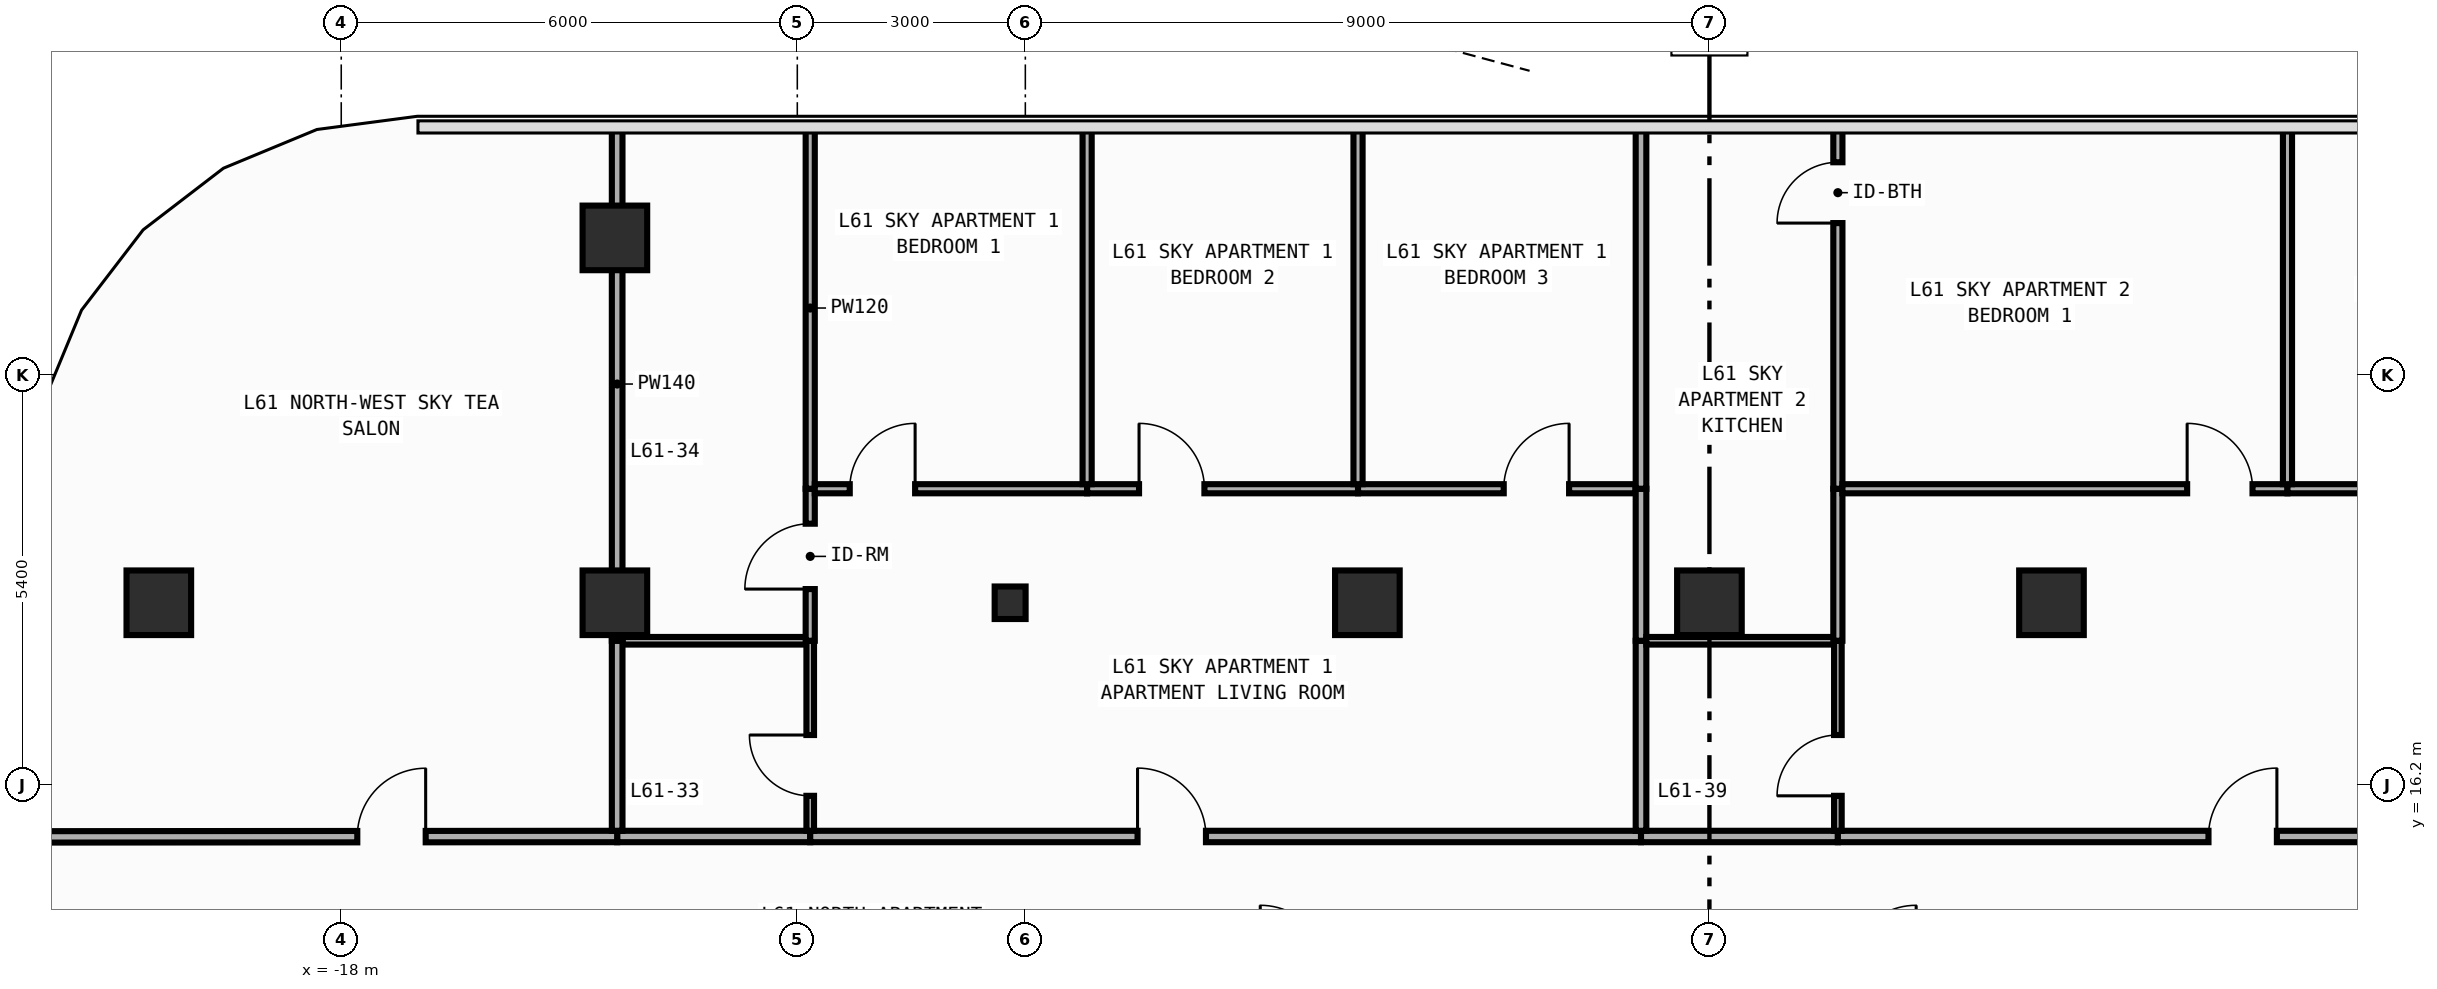
"""IFC4 building model, lengths in metres.
Left out: names, types, materials, properties, quantities, classifications, styles, units other than length and angle.
Written with IfcOpenShell. Run it as: python <this file> out.ifc"""

import sys

from ifc_helpers import new_model, si_unit, direction, frame, frame_2d, origin, origin_2d, place, context, subcontext, project, spatial, rectangle, i_section, extrude, element, fill, save


model = new_model("IFC4")
c1 = context("Model", 3, precision=1e-05, world=origin(), true_north=direction((0.0, 1.0)))
c2 = subcontext(c1, "Body", "Model", "MODEL_VIEW")
j1 = project(units=[si_unit("LENGTHUNIT", "METRE"), si_unit("PLANEANGLEUNIT", "RADIAN")], contexts=[c1])
p1 = place(None, origin())
s1 = spatial("IfcSite", under=j1, at=p1, CompositionType="ELEMENT")
p2 = place(p1, origin())
s2 = spatial("IfcBuilding", under=s1, at=p2, CompositionType="ELEMENT")
p3 = place(p2, frame((0.0, 0.0, 258.4)))
s3 = spatial("IfcBuildingStorey", under=s2, at=p3, CompositionType="ELEMENT", Elevation=258.4)
p4 = place(p3, frame((-9.2, 18.6, 0.0), z_axis=(0.0, 0.0, 1.0), x_axis=(1.0, 0.0, 0.0)))
e1 = element("IfcColumn", 1, at=p4, inside=s3, PredefinedType="COLUMN", context=c2, shape_type="SweptSolid", body=[
    extrude(i_section(OverallWidth=0.407, OverallDepth=0.428, WebThickness=0.02, FlangeThickness=0.035, FilletRadius=0.022, at=origin_2d()), origin(), (0.0, 0.0, 1.0), 3.6),
])
for number, where, z_axis, x_axis in (
    (2, (-20.4, 18.6, 0.0), (0.0, 0.0, 1.0), (1.0, 0.0, 0.0)),
    (3, (-14.4, 18.6, 0.0), (0.0, 0.0, 1.0), (1.0, 0.0, 0.0)),
    (4, (-4.5, 18.6, 0.0), (0.0, 0.0, 1.0), (1.0, 0.0, 0.0)),
    (5, (0.0, 18.6, 0.0), (0.0, 0.0, 1.0), (1.0, 0.0, 0.0)),
    (6, (4.5, 18.6, 0.0), (0.0, 0.0, 1.0), (1.0, 0.0, 0.0)),
    (7, (-14.4, 23.4, 0.0), (0.0, 0.0, 1.0), (1.0, 0.0, 0.0)),
):
    element("IfcColumn", number, at=place(p3, frame(where, z_axis=z_axis, x_axis=x_axis)), inside=s3, PredefinedType="COLUMN", context=c2, shape_type="SweptSolid", body=[
        extrude(rectangle(XDim=0.85, YDim=0.85, at=origin_2d()), origin(), (0.0, 0.0, 1.0), 3.6),
    ])
p5 = place(p3, frame((-14.37, 15.525, 0.0), z_axis=(0.0, 0.0, 1.0), x_axis=(1.0, 0.0, 0.0)))
e8 = element("IfcWall", 8, at=p5, inside=s3, PredefinedType="PARTITIONING", context=c2, shape_type="SweptSolid", body=[
    extrude(rectangle(XDim=2.54, YDim=0.15, at=frame_2d((1.27, 0.0))), origin(), (0.0, 0.0, 1.0), 3.34),
])
p6 = place(p3, frame((-11.83, 15.525, 0.0), z_axis=(0.0, 0.0, 1.0), x_axis=(1.0, 0.0, 0.0)))
e9 = element("IfcWall", 9, at=p6, inside=s3, PredefinedType="PARTITIONING", context=c2, shape_type="SweptSolid", body=[
    extrude(rectangle(XDim=10.93, YDim=0.15, at=frame_2d((5.465, 0.0))), origin(), (0.0, 0.0, 1.0), 3.34),
])
p7 = place(p6, frame((4.306, 0.0, 0.0)))
e10 = element("IfcOpeningElement", 10, at=p7, cuts=e9, PredefinedType="OPENING", context=c2, shape_type="SweptSolid", body=[
    extrude(rectangle(XDim=0.9, YDim=2.15, at=frame_2d((0.45, 1.075))), frame((0.0, 0.085, 0.0), z_axis=(0.0, -1.0, 0.0), x_axis=(1.0, 0.0, 0.0)), (0.0, 0.0, 1.0), 0.17),
])
p8 = place(p3, frame((-0.9, 15.525, 0.0), z_axis=(0.0, 0.0, 1.0), x_axis=(1.0, 0.0, 0.0)))
e11 = element("IfcWall", 11, at=p8, inside=s3, PredefinedType="PARTITIONING", context=c2, shape_type="SweptSolid", body=[
    extrude(rectangle(XDim=2.59, YDim=0.15, at=frame_2d((1.295, 0.0))), origin(), (0.0, 0.0, 1.0), 3.34),
])
p9 = place(p3, frame((1.69, 15.525, 0.0), z_axis=(0.0, 0.0, 1.0), x_axis=(1.0, 0.0, 0.0)))
e12 = element("IfcWall", 12, at=p9, inside=s3, PredefinedType="PARTITIONING", context=c2, shape_type="SweptSolid", body=[
    extrude(rectangle(XDim=10.25, YDim=0.15, at=frame_2d((5.125, 0.0))), origin(), (0.0, 0.0, 1.0), 3.34),
])
p10 = place(p9, frame((4.876, 0.0, 0.0)))
e13 = element("IfcOpeningElement", 13, at=p10, cuts=e12, PredefinedType="OPENING", context=c2, shape_type="SweptSolid", body=[
    extrude(rectangle(XDim=0.9, YDim=2.15, at=frame_2d((0.45, 1.075))), frame((0.0, 0.085, 0.0), z_axis=(0.0, -1.0, 0.0), x_axis=(1.0, 0.0, 0.0)), (0.0, 0.0, 1.0), 0.17),
])
p11 = place(p3, frame((-21.955, 15.52, 0.0), z_axis=(0.0, 0.0, 1.0), x_axis=(0.999999792794, 0.000643749062, 0.0)))
e14 = element("IfcWall", 14, at=p11, inside=s3, PredefinedType="PARTITIONING", context=c2, shape_type="SweptSolid", body=[
    extrude(rectangle(XDim=7.585, YDim=0.15, at=frame_2d((3.792, 0.0))), origin(), (0.0, 0.0, 1.0), 3.34),
])
p12 = place(p11, frame((4.166, 0.0, 0.0)))
e15 = element("IfcOpeningElement", 15, at=p12, cuts=e14, PredefinedType="OPENING", context=c2, shape_type="SweptSolid", body=[
    extrude(rectangle(XDim=0.9, YDim=2.15, at=frame_2d((0.45, 1.075))), frame((0.0, 0.085, 0.0), z_axis=(0.0, -1.0, 0.0), x_axis=(1.0, 0.0, 0.0)), (0.0, 0.0, 1.0), 0.17),
])
p13 = place(p3, frame((-14.3, 18.1, 0.0), z_axis=(0.0, 0.0, 1.0), x_axis=(1.0, 0.0, 0.0)))
e16 = element("IfcWall", 16, at=p13, inside=s3, PredefinedType="PARTITIONING", context=c2, shape_type="SweptSolid", body=[
    extrude(rectangle(XDim=2.42, YDim=0.1, at=frame_2d((1.21, 0.0))), origin(), (0.0, 0.0, 1.0), 3.34),
])
p14 = place(p3, frame((-11.83, 15.6, 0.0), z_axis=(0.0, 0.0, 1.0), x_axis=(0.0, 1.0, 0.0)))
e17 = element("IfcWall", 17, at=p14, inside=s3, PredefinedType="PARTITIONING", context=c2, shape_type="SweptSolid", body=[
    extrude(rectangle(XDim=2.5, YDim=0.1, at=frame_2d((1.25, 0.0))), origin(), (0.0, 0.0, 1.0), 3.34),
])
p15 = place(p14, frame((0.46, 0.0, 0.0)))
e18 = element("IfcOpeningElement", 18, at=p15, cuts=e17, PredefinedType="OPENING", context=c2, shape_type="SweptSolid", body=[
    extrude(rectangle(XDim=0.8, YDim=2.1, at=frame_2d((0.4, 1.05))), frame((0.0, 0.06, 0.0), z_axis=(0.0, -1.0, 0.0), x_axis=(1.0, 0.0, 0.0)), (0.0, 0.0, 1.0), 0.12),
])
p16 = place(p3, frame((-14.37, 15.6, 0.0), z_axis=(0.0, 0.0, 1.0), x_axis=(0.0, 1.0, 0.0)))
e19 = element("IfcWall", 19, at=p16, inside=s3, PredefinedType="PARTITIONING", context=c2, shape_type="SweptSolid", body=[
    extrude(rectangle(XDim=2.5, YDim=0.14, at=frame_2d((1.25, 0.0))), origin(), (0.0, 0.0, 1.0), 3.34),
])
p17 = place(p3, frame((-11.83, 18.1, 0.0), z_axis=(0.0, 0.0, 1.0), x_axis=(0.0, 1.0, 0.0)))
e20 = element("IfcWall", 20, at=p17, inside=s3, PredefinedType="PARTITIONING", context=c2, shape_type="SweptSolid", body=[
    extrude(rectangle(XDim=2.0, YDim=0.12, at=frame_2d((1.0, 0.0))), origin(), (0.0, 0.0, 1.0), 3.34),
])
p18 = place(p17, frame((0.68, 0.0, 0.0)))
e21 = element("IfcOpeningElement", 21, at=p18, cuts=e20, PredefinedType="OPENING", context=c2, shape_type="SweptSolid", body=[
    extrude(rectangle(XDim=0.86, YDim=2.15, at=frame_2d((0.43, 1.075))), frame((0.0, 0.07, 0.0), z_axis=(0.0, -1.0, 0.0), x_axis=(1.0, 0.0, 0.0)), (0.0, 0.0, 1.0), 0.14),
])
p19 = place(p3, frame((-11.83, 20.1, 0.0), z_axis=(0.0, 0.0, 1.0), x_axis=(0.0, 1.0, 0.0)))
e22 = element("IfcWall", 22, at=p19, inside=s3, PredefinedType="PARTITIONING", context=c2, shape_type="SweptSolid", body=[
    extrude(rectangle(XDim=4.755, YDim=0.12, at=frame_2d((2.377, 0.0))), origin(), (0.0, 0.0, 1.0), 3.34),
])
p20 = place(p3, frame((-14.37, 18.1, 0.0), z_axis=(0.0, 0.0, 1.0), x_axis=(0.0, 1.0, 0.0)))
e23 = element("IfcWall", 23, at=p20, inside=s3, PredefinedType="PARTITIONING", context=c2, shape_type="SweptSolid", body=[
    extrude(rectangle(XDim=6.755, YDim=0.14, at=frame_2d((3.377, 0.0))), origin(), (0.0, 0.0, 1.0), 1.94),
])
p21 = place(p3, frame((-11.77, 20.1, 0.0), z_axis=(0.0, 0.0, 1.0), x_axis=(1.0, 0.0, 0.0)))
e24 = element("IfcWall", 24, at=p21, inside=s3, PredefinedType="PARTITIONING", context=c2, shape_type="SweptSolid", body=[
    extrude(rectangle(XDim=3.583, YDim=0.12, at=frame_2d((1.792, 0.0))), origin(), (0.0, 0.0, 1.0), 3.34),
])
p22 = place(p21, frame((0.46, 0.0, 0.0)))
e25 = element("IfcOpeningElement", 25, at=p22, cuts=e24, PredefinedType="OPENING", context=c2, shape_type="SweptSolid", body=[
    extrude(rectangle(XDim=0.86, YDim=2.15, at=frame_2d((0.43, 1.075))), frame((0.0, 0.07, 0.0), z_axis=(0.0, -1.0, 0.0), x_axis=(1.0, 0.0, 0.0)), (0.0, 0.0, 1.0), 0.14),
])
p23 = place(p3, frame((-8.187, 20.1, 0.0), z_axis=(0.0, 0.0, 1.0), x_axis=(1.0, 0.0, 0.0)))
e26 = element("IfcWall", 26, at=p23, inside=s3, PredefinedType="PARTITIONING", context=c2, shape_type="SweptSolid", body=[
    extrude(rectangle(XDim=3.564, YDim=0.12, at=frame_2d((1.782, 0.0))), origin(), (0.0, 0.0, 1.0), 3.34),
])
p24 = place(p23, frame((0.683, 0.0, 0.0)))
e27 = element("IfcOpeningElement", 27, at=p24, cuts=e26, PredefinedType="OPENING", context=c2, shape_type="SweptSolid", body=[
    extrude(rectangle(XDim=0.86, YDim=2.15, at=frame_2d((0.43, 1.075))), frame((0.0, 0.07, 0.0), z_axis=(0.0, -1.0, 0.0), x_axis=(1.0, 0.0, 0.0)), (0.0, 0.0, 1.0), 0.14),
])
p25 = place(p3, frame((-4.623, 20.1, 0.0), z_axis=(0.0, 0.0, 1.0), x_axis=(1.0, 0.0, 0.0)))
e28 = element("IfcWall", 28, at=p25, inside=s3, PredefinedType="PARTITIONING", context=c2, shape_type="SweptSolid", body=[
    extrude(rectangle(XDim=3.653, YDim=0.12, at=frame_2d((1.827, 0.0))), origin(), (0.0, 0.0, 1.0), 3.34),
])
p26 = place(p25, frame((1.917, 0.0, 0.0)))
e29 = element("IfcOpeningElement", 29, at=p26, cuts=e28, PredefinedType="OPENING", context=c2, shape_type="SweptSolid", body=[
    extrude(rectangle(XDim=0.86, YDim=2.15, at=frame_2d((0.43, 1.075))), frame((0.0, 0.07, 0.0), z_axis=(0.0, -1.0, 0.0), x_axis=(1.0, 0.0, 0.0)), (0.0, 0.0, 1.0), 0.14),
])
p27 = place(p3, frame((-0.9, 15.6, 0.0), z_axis=(0.0, 0.0, 1.0), x_axis=(0.0, 1.0, 0.0)))
e30 = element("IfcWall", 30, at=p27, inside=s3, PredefinedType="PARTITIONING", context=c2, shape_type="SweptSolid", body=[
    extrude(rectangle(XDim=2.5, YDim=0.14, at=frame_2d((1.25, 0.0))), origin(), (0.0, 0.0, 1.0), 3.34),
])
p28 = place(p3, frame((-0.9, 18.1, 0.0), z_axis=(0.0, 0.0, 1.0), x_axis=(0.0, 1.0, 0.0)))
e31 = element("IfcWall", 31, at=p28, inside=s3, PredefinedType="PARTITIONING", context=c2, shape_type="SweptSolid", body=[
    extrude(rectangle(XDim=2.0, YDim=0.14, at=frame_2d((1.0, 0.0))), origin(), (0.0, 0.0, 1.0), 3.34),
])
for number, where, z_axis, x_axis in (
    (32, (-8.187, 20.16, 0.0), (0.0, 0.0, 1.0), (0.0, 1.0, 0.0)),
    (33, (-4.623, 20.16, 0.0), (0.0, 0.0, 1.0), (0.0, 1.0, 0.0)),
):
    element("IfcWall", number, at=place(p3, frame(where, z_axis=z_axis, x_axis=x_axis)), inside=s3, PredefinedType="PARTITIONING", context=c2, shape_type="SweptSolid", body=[
        extrude(rectangle(XDim=4.695, YDim=0.12, at=frame_2d((2.348, 0.0))), origin(), (0.0, 0.0, 1.0), 3.34),
    ])
p29 = place(p3, frame((-0.9, 20.1, 0.0), z_axis=(0.0, 0.0, 1.0), x_axis=(0.0, 1.0, 0.0)))
e34 = element("IfcWall", 34, at=p29, inside=s3, PredefinedType="PARTITIONING", context=c2, shape_type="SweptSolid", body=[
    extrude(rectangle(XDim=4.755, YDim=0.14, at=frame_2d((2.377, 0.0))), origin(), (0.0, 0.0, 1.0), 3.34),
])
p30 = place(p3, frame((-0.83, 18.1, 0.0), z_axis=(0.0, 0.0, 1.0), x_axis=(1.0, 0.0, 0.0)))
e35 = element("IfcWall", 35, at=p30, inside=s3, PredefinedType="PARTITIONING", context=c2, shape_type="SweptSolid", body=[
    extrude(rectangle(XDim=2.47, YDim=0.1, at=frame_2d((1.235, 0.0))), origin(), (0.0, 0.0, 1.0), 3.34),
])
p31 = place(p3, frame((1.69, 15.6, 0.0), z_axis=(0.0, 0.0, 1.0), x_axis=(0.0, 1.0, 0.0)))
e36 = element("IfcWall", 36, at=p31, inside=s3, PredefinedType="PARTITIONING", context=c2, shape_type="SweptSolid", body=[
    extrude(rectangle(XDim=2.5, YDim=0.1, at=frame_2d((1.25, 0.0))), origin(), (0.0, 0.0, 1.0), 3.34),
])
p32 = place(p31, frame((0.46, 0.0, 0.0)))
e37 = element("IfcOpeningElement", 37, at=p32, cuts=e36, PredefinedType="OPENING", context=c2, shape_type="SweptSolid", body=[
    extrude(rectangle(XDim=0.8, YDim=2.1, at=frame_2d((0.4, 1.05))), frame((0.0, 0.06, 0.0), z_axis=(0.0, -1.0, 0.0), x_axis=(1.0, 0.0, 0.0)), (0.0, 0.0, 1.0), 0.12),
])
p33 = place(p3, frame((1.69, 18.1, 0.0), z_axis=(0.0, 0.0, 1.0), x_axis=(0.0, 1.0, 0.0)))
e38 = element("IfcWall", 38, at=p33, inside=s3, PredefinedType="PARTITIONING", context=c2, shape_type="SweptSolid", body=[
    extrude(rectangle(XDim=2.0, YDim=0.12, at=frame_2d((1.0, 0.0))), origin(), (0.0, 0.0, 1.0), 3.34),
])
p34 = place(p3, frame((1.69, 20.1, 0.0), z_axis=(0.0, 0.0, 1.0), x_axis=(0.0, 1.0, 0.0)))
e39 = element("IfcWall", 39, at=p34, inside=s3, PredefinedType="PARTITIONING", context=c2, shape_type="SweptSolid", body=[
    extrude(rectangle(XDim=4.755, YDim=0.12, at=frame_2d((2.377, 0.0))), origin(), (0.0, 0.0, 1.0), 3.34),
])
p35 = place(p34, frame((3.495, 0.0, 0.0)))
e40 = element("IfcOpeningElement", 40, at=p35, cuts=e39, PredefinedType="OPENING", context=c2, shape_type="SweptSolid", body=[
    extrude(rectangle(XDim=0.8, YDim=2.1, at=frame_2d((0.4, 1.05))), frame((0.0, 0.07, 0.0), z_axis=(0.0, -1.0, 0.0), x_axis=(1.0, 0.0, 0.0)), (0.0, 0.0, 1.0), 0.14),
])
p36 = place(p3, frame((1.75, 20.1, 0.0), z_axis=(0.0, 0.0, 1.0), x_axis=(1.0, 0.0, 0.0)))
e41 = element("IfcWall", 41, at=p36, inside=s3, PredefinedType="PARTITIONING", context=c2, shape_type="SweptSolid", body=[
    extrude(rectangle(XDim=5.855, YDim=0.12, at=frame_2d((2.927, 0.0))), origin(), (0.0, 0.0, 1.0), 3.34),
])
p37 = place(p36, frame((4.535, 0.0, 0.0)))
e42 = element("IfcOpeningElement", 42, at=p37, cuts=e41, PredefinedType="OPENING", context=c2, shape_type="SweptSolid", body=[
    extrude(rectangle(XDim=0.86, YDim=2.15, at=frame_2d((0.43, 1.075))), frame((0.0, 0.07, 0.0), z_axis=(0.0, -1.0, 0.0), x_axis=(1.0, 0.0, 0.0)), (0.0, 0.0, 1.0), 0.14),
])
p38 = place(p3, frame((7.605, 20.1, 0.0), z_axis=(0.0, 0.0, 1.0), x_axis=(1.0, 0.0, 0.0)))
e43 = element("IfcWall", 43, at=p38, inside=s3, PredefinedType="PARTITIONING", context=c2, shape_type="SweptSolid", body=[
    extrude(rectangle(XDim=6.075, YDim=0.12, at=frame_2d((3.038, 0.0))), origin(), (0.0, 0.0, 1.0), 3.34),
])
p39 = place(p38, frame((3.528, 0.0, 0.0)))
e44 = element("IfcOpeningElement", 44, at=p39, cuts=e43, PredefinedType="OPENING", context=c2, shape_type="SweptSolid", body=[
    extrude(rectangle(XDim=0.86, YDim=2.15, at=frame_2d((0.43, 1.075))), frame((0.0, 0.07, 0.0), z_axis=(0.0, -1.0, 0.0), x_axis=(1.0, 0.0, 0.0)), (0.0, 0.0, 1.0), 0.14),
])
p40 = place(p3, frame((7.605, 20.16, 0.0), z_axis=(0.0, 0.0, 1.0), x_axis=(0.0, 1.0, 0.0)))
e45 = element("IfcWall", 45, at=p40, inside=s3, PredefinedType="PARTITIONING", context=c2, shape_type="SweptSolid", body=[
    extrude(rectangle(XDim=4.695, YDim=0.12, at=frame_2d((2.348, 0.0))), origin(), (0.0, 0.0, 1.0), 3.34),
])
p41 = place(p7, origin())
e46 = element("IfcDoor", 46, at=p41, inside=s3, OperationType="SINGLE_SWING_LEFT", PredefinedType="DOOR", context=c2, shape_type="SweptSolid", body=[
    extrude(rectangle(XDim=0.9, YDim=2.15, at=frame_2d((0.45, 1.075))), frame((0.0, 0.025, 0.0), z_axis=(0.0, -1.0, 0.0), x_axis=(1.0, 0.0, 0.0)), (0.0, 0.0, 1.0), 0.05),
])
fill(e10, e46)
p42 = place(p10, origin())
e47 = element("IfcDoor", 47, at=p42, inside=s3, OperationType="SINGLE_SWING_RIGHT", PredefinedType="DOOR", context=c2, shape_type="SweptSolid", body=[
    extrude(rectangle(XDim=0.9, YDim=2.15, at=frame_2d((0.45, 1.075))), frame((0.0, 0.025, 0.0), z_axis=(0.0, -1.0, 0.0), x_axis=(1.0, 0.0, 0.0)), (0.0, 0.0, 1.0), 0.05),
])
fill(e13, e47)
p43 = place(p12, origin())
e48 = element("IfcDoor", 48, at=p43, inside=s3, OperationType="SINGLE_SWING_RIGHT", PredefinedType="DOOR", context=c2, shape_type="SweptSolid", body=[
    extrude(rectangle(XDim=0.9, YDim=2.15, at=frame_2d((0.45, 1.075))), frame((0.0, 0.025, 0.0), z_axis=(0.0, -1.0, 0.0), x_axis=(1.0, 0.0, 0.0)), (0.0, 0.0, 1.0), 0.05),
])
fill(e15, e48)
p44 = place(p15, origin())
e49 = element("IfcDoor", 49, at=p44, inside=s3, OperationType="SINGLE_SWING_RIGHT", PredefinedType="DOOR", context=c2, shape_type="SweptSolid", body=[
    extrude(rectangle(XDim=0.8, YDim=2.1, at=frame_2d((0.4, 1.05))), frame((0.0, 0.025, 0.0), z_axis=(0.0, -1.0, 0.0), x_axis=(1.0, 0.0, 0.0)), (0.0, 0.0, 1.0), 0.05),
])
fill(e18, e49)
p45 = place(p18, origin())
e50 = element("IfcDoor", 50, at=p45, inside=s3, OperationType="SINGLE_SWING_LEFT", PredefinedType="DOOR", context=c2, shape_type="SweptSolid", body=[
    extrude(rectangle(XDim=0.86, YDim=2.15, at=frame_2d((0.43, 1.075))), frame((0.0, 0.025, 0.0), z_axis=(0.0, -1.0, 0.0), x_axis=(1.0, 0.0, 0.0)), (0.0, 0.0, 1.0), 0.05),
])
fill(e21, e50)
p46 = place(p22, origin())
e51 = element("IfcDoor", 51, at=p46, inside=s3, OperationType="SINGLE_SWING_RIGHT", PredefinedType="DOOR", context=c2, shape_type="SweptSolid", body=[
    extrude(rectangle(XDim=0.86, YDim=2.15, at=frame_2d((0.43, 1.075))), frame((0.0, 0.025, 0.0), z_axis=(0.0, -1.0, 0.0), x_axis=(1.0, 0.0, 0.0)), (0.0, 0.0, 1.0), 0.05),
])
fill(e25, e51)
p47 = place(p24, origin())
e52 = element("IfcDoor", 52, at=p47, inside=s3, OperationType="SINGLE_SWING_LEFT", PredefinedType="DOOR", context=c2, shape_type="SweptSolid", body=[
    extrude(rectangle(XDim=0.86, YDim=2.15, at=frame_2d((0.43, 1.075))), frame((0.0, 0.025, 0.0), z_axis=(0.0, -1.0, 0.0), x_axis=(1.0, 0.0, 0.0)), (0.0, 0.0, 1.0), 0.05),
])
fill(e27, e52)
p48 = place(p26, origin())
e53 = element("IfcDoor", 53, at=p48, inside=s3, OperationType="SINGLE_SWING_RIGHT", PredefinedType="DOOR", context=c2, shape_type="SweptSolid", body=[
    extrude(rectangle(XDim=0.86, YDim=2.15, at=frame_2d((0.43, 1.075))), frame((0.0, 0.025, 0.0), z_axis=(0.0, -1.0, 0.0), x_axis=(1.0, 0.0, 0.0)), (0.0, 0.0, 1.0), 0.05),
])
fill(e29, e53)
p49 = place(p32, origin())
e54 = element("IfcDoor", 54, at=p49, inside=s3, OperationType="SINGLE_SWING_LEFT", PredefinedType="DOOR", context=c2, shape_type="SweptSolid", body=[
    extrude(rectangle(XDim=0.8, YDim=2.1, at=frame_2d((0.4, 1.05))), frame((0.0, 0.025, 0.0), z_axis=(0.0, -1.0, 0.0), x_axis=(1.0, 0.0, 0.0)), (0.0, 0.0, 1.0), 0.05),
])
fill(e37, e54)
p50 = place(p37, origin())
e55 = element("IfcDoor", 55, at=p50, inside=s3, OperationType="SINGLE_SWING_LEFT", PredefinedType="DOOR", context=c2, shape_type="SweptSolid", body=[
    extrude(rectangle(XDim=0.86, YDim=2.15, at=frame_2d((0.43, 1.075))), frame((0.0, 0.025, 0.0), z_axis=(0.0, -1.0, 0.0), x_axis=(1.0, 0.0, 0.0)), (0.0, 0.0, 1.0), 0.05),
])
fill(e42, e55)
p51 = place(p35, origin())
e56 = element("IfcDoor", 56, at=p51, inside=s3, OperationType="SINGLE_SWING_LEFT", PredefinedType="DOOR", context=c2, shape_type="SweptSolid", body=[
    extrude(rectangle(XDim=0.8, YDim=2.1, at=frame_2d((0.4, 1.05))), frame((0.0, 0.025, 0.0), z_axis=(0.0, -1.0, 0.0), x_axis=(1.0, 0.0, 0.0)), (0.0, 0.0, 1.0), 0.05),
])
fill(e40, e56)
save(model, sys.argv[1])
